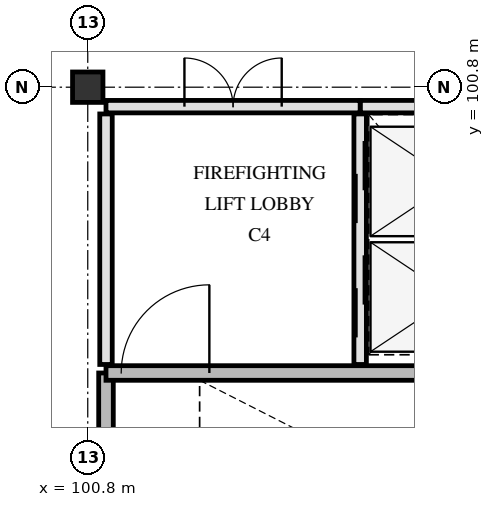
"""IFC4 building model, lengths in metres.
Left out: names, types, materials, properties, quantities, classifications, styles, units other than length and angle.
Written with IfcOpenShell. Run it as: python <this file> out.ifc"""

import sys

from ifc_helpers import new_model, si_unit, direction, frame, frame_2d, origin, origin_2d, place, context, subcontext, project, spatial, rectangle, extrude, element, fill, save


model = new_model("IFC4")
c1 = context("Model", 3, precision=1e-05, world=origin(), true_north=direction((0.0, 1.0)))
c2 = subcontext(c1, "Body", "Model", "MODEL_VIEW")
j1 = project(units=[si_unit("LENGTHUNIT", "METRE"), si_unit("PLANEANGLEUNIT", "RADIAN")], contexts=[c1])
p1 = place(None, origin())
s1 = spatial("IfcSite", under=j1, at=p1, CompositionType="ELEMENT")
p2 = place(p1, origin())
s2 = spatial("IfcBuilding", under=s1, at=p2, CompositionType="ELEMENT")
p3 = place(p2, frame((0.0, 0.0, 30.3)))
s3 = spatial("IfcBuildingStorey", under=s2, at=p3, CompositionType="ELEMENT", Elevation=30.3)
p4 = place(p3, frame((100.8, 100.8, 0.0), z_axis=(0.0, 0.0, 1.0), x_axis=(1.0, 0.0, 0.0)))
e1 = element("IfcColumn", 1, at=p4, inside=s3, PredefinedType="COLUMN", context=c2, shape_type="SweptSolid", body=[
    extrude(rectangle(XDim=0.5, YDim=0.5, at=origin_2d()), origin(), (0.0, 0.0, 1.0), 3.9),
])
p5 = place(p3, frame((101.1, 92.78, 0.0), z_axis=(0.0, 0.0, 1.0), x_axis=(0.0, 1.0, 0.0)))
e2 = element("IfcWall", 2, at=p5, inside=s3, PredefinedType="SHEAR", context=c2, shape_type="SweptSolid", body=[
    extrude(rectangle(XDim=3.32, YDim=0.24, at=frame_2d((1.66, 0.0))), origin(), (0.0, 0.0, 1.0), 3.66),
])
p6 = place(p3, frame((101.1, 96.1, 0.0), z_axis=(0.0, 0.0, 1.0), x_axis=(1.0, 0.0, 0.0)))
e3 = element("IfcWall", 3, at=p6, inside=s3, PredefinedType="SHEAR", context=c2, shape_type="SweptSolid", body=[
    extrude(rectangle(XDim=7.82, YDim=0.24, at=frame_2d((3.91, 0.0))), origin(), (0.0, 0.0, 1.0), 3.66),
])
p7 = place(p6, frame((0.25, 0.0, 0.0)))
e4 = element("IfcOpeningElement", 4, at=p7, cuts=e3, PredefinedType="OPENING", context=c2, shape_type="SweptSolid", body=[
    extrude(rectangle(XDim=1.45, YDim=2.2, at=frame_2d((0.725, 1.1))), frame((0.0, 0.13, 0.0), z_axis=(0.0, -1.0, 0.0), x_axis=(1.0, 0.0, 0.0)), (0.0, 0.0, 1.0), 0.26),
])
p8 = place(p3, frame((105.28, 96.24, 0.0), z_axis=(0.0, 0.0, 1.0), x_axis=(0.0, 1.0, 0.0)))
e5 = element("IfcWall", 5, at=p8, inside=s3, PredefinedType="PARTITIONING", context=c2, shape_type="SweptSolid", body=[
    extrude(rectangle(XDim=4.12, YDim=0.205, at=frame_2d((2.06, 0.0))), origin(), (0.0, 0.0, 1.0), 3.65),
])
p9 = place(p8, frame((0.445, 0.0, 0.0)))
e6 = element("IfcOpeningElement", 6, at=p9, cuts=e5, PredefinedType="OPENING", context=c2, shape_type="SweptSolid", body=[
    extrude(rectangle(XDim=1.35, YDim=2.2, at=frame_2d((0.675, 1.1))), frame((0.0, 0.113, 0.0), z_axis=(0.0, -1.0, 0.0), x_axis=(1.0, 0.0, 0.0)), (0.0, 0.0, 1.0), 0.225),
])
p10 = place(p8, frame((2.325, 0.0, 0.0)))
e7 = element("IfcOpeningElement", 7, at=p10, cuts=e5, PredefinedType="OPENING", context=c2, shape_type="SweptSolid", body=[
    extrude(rectangle(XDim=1.35, YDim=2.2, at=frame_2d((0.675, 1.1))), frame((0.0, 0.113, 0.0), z_axis=(0.0, -1.0, 0.0), x_axis=(1.0, 0.0, 0.0)), (0.0, 0.0, 1.0), 0.225),
])
p11 = place(p3, frame((105.28, 100.48, 0.0), z_axis=(0.0, 0.0, 1.0), x_axis=(1.0, 0.0, 0.0)))
e8 = element("IfcWall", 8, at=p11, inside=s3, PredefinedType="PARTITIONING", context=c2, shape_type="SweptSolid", body=[
    extrude(rectangle(XDim=3.57, YDim=0.205, at=frame_2d((1.785, 0.0))), origin(), (0.0, 0.0, 1.0), 3.65),
])
p12 = place(p3, frame((101.1, 96.24, 0.0), z_axis=(0.0, 0.0, 1.0), x_axis=(0.0, 1.0, 0.0)))
e9 = element("IfcWall", 9, at=p12, inside=s3, PredefinedType="PARTITIONING", context=c2, shape_type="SweptSolid", body=[
    extrude(rectangle(XDim=4.12, YDim=0.205, at=frame_2d((2.06, 0.0))), origin(), (0.0, 0.0, 1.0), 3.65),
])
p13 = place(p3, frame((101.1, 100.48, 0.0), z_axis=(0.0, 0.0, 1.0), x_axis=(1.0, 0.0, 0.0)))
e10 = element("IfcWall", 10, at=p13, inside=s3, PredefinedType="PARTITIONING", context=c2, shape_type="SweptSolid", body=[
    extrude(rectangle(XDim=4.18, YDim=0.205, at=frame_2d((2.09, 0.0))), origin(), (0.0, 0.0, 1.0), 3.65),
])
p14 = place(p13, frame((1.29, 0.0, 0.0)))
e11 = element("IfcOpeningElement", 11, at=p14, cuts=e10, PredefinedType="OPENING", context=c2, shape_type="SweptSolid", body=[
    extrude(rectangle(XDim=1.6, YDim=2.25, at=frame_2d((0.8, 1.125))), frame((0.0, 0.113, 0.0), z_axis=(0.0, -1.0, 0.0), x_axis=(1.0, 0.0, 0.0)), (0.0, 0.0, 1.0), 0.225),
])
p15 = place(p7, origin())
e12 = element("IfcDoor", 12, at=p15, inside=s3, OperationType="SINGLE_SWING_RIGHT", PredefinedType="DOOR", context=c2, shape_type="SweptSolid", body=[
    extrude(rectangle(XDim=1.45, YDim=2.2, at=frame_2d((0.725, 1.1))), frame((0.0, 0.025, 0.0), z_axis=(0.0, -1.0, 0.0), x_axis=(1.0, 0.0, 0.0)), (0.0, 0.0, 1.0), 0.05),
])
fill(e4, e12)
p16 = place(p9, origin())
e13 = element("IfcDoor", 13, at=p16, inside=s3, OperationType="SLIDING_TO_LEFT", PredefinedType="DOOR", context=c2, shape_type="SweptSolid", body=[
    extrude(rectangle(XDim=1.35, YDim=2.2, at=frame_2d((0.675, 1.1))), frame((0.0, 0.025, 0.0), z_axis=(0.0, -1.0, 0.0), x_axis=(1.0, 0.0, 0.0)), (0.0, 0.0, 1.0), 0.05),
])
fill(e6, e13)
p17 = place(p10, origin())
e14 = element("IfcDoor", 14, at=p17, inside=s3, OperationType="SLIDING_TO_LEFT", PredefinedType="DOOR", context=c2, shape_type="SweptSolid", body=[
    extrude(rectangle(XDim=1.35, YDim=2.2, at=frame_2d((0.675, 1.1))), frame((0.0, 0.025, 0.0), z_axis=(0.0, -1.0, 0.0), x_axis=(1.0, 0.0, 0.0)), (0.0, 0.0, 1.0), 0.05),
])
fill(e7, e14)
p18 = place(p14, origin())
e15 = element("IfcDoor", 15, at=p18, inside=s3, OperationType="DOUBLE_SWING_LEFT", PredefinedType="DOOR", context=c2, shape_type="SweptSolid", body=[
    extrude(rectangle(XDim=1.6, YDim=2.25, at=frame_2d((0.8, 1.125))), frame((0.0, 0.025, 0.0), z_axis=(0.0, -1.0, 0.0), x_axis=(1.0, 0.0, 0.0)), (0.0, 0.0, 1.0), 0.05),
])
fill(e11, e15)
save(model, sys.argv[1])
